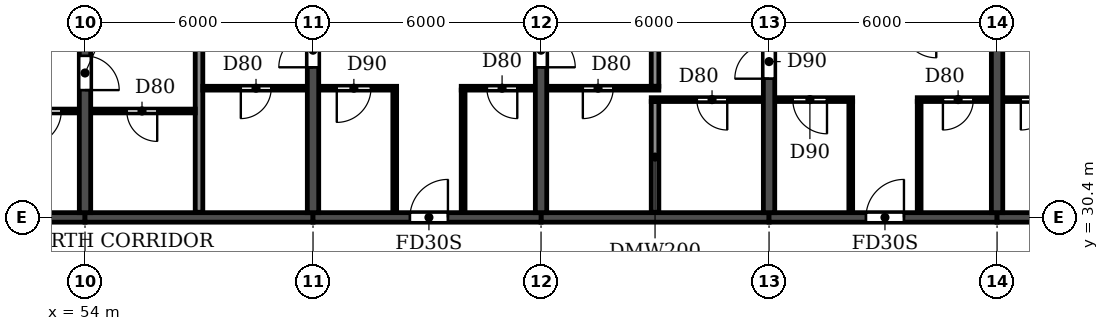
"""IFC4 building model, lengths in metres.
Left out: names, types, materials, properties, quantities, classifications, styles, units other than length and angle.
Written with IfcOpenShell. Run it as: python <this file> out.ifc"""

import sys

from ifc_helpers import new_model, si_unit, direction, frame, frame_2d, origin, place, context, subcontext, project, spatial, rectangle, extrude, element, fill, save


model = new_model("IFC4")
c1 = context("Model", 3, precision=1e-05, world=origin(), true_north=direction((0.0, 1.0)))
c2 = subcontext(c1, "Body", "Model", "MODEL_VIEW")
j1 = project(units=[si_unit("LENGTHUNIT", "METRE"), si_unit("PLANEANGLEUNIT", "RADIAN")], contexts=[c1])
p1 = place(None, origin())
s1 = spatial("IfcSite", under=j1, at=p1, CompositionType="ELEMENT")
p2 = place(p1, origin())
s2 = spatial("IfcBuilding", under=s1, at=p2, CompositionType="ELEMENT")
p3 = place(p2, frame((0.0, 0.0, 155.4)))
s3 = spatial("IfcBuildingStorey", under=s2, at=p3, CompositionType="ELEMENT", Elevation=155.4)
p4 = place(p3, frame((54.0, 30.525, 0.0), z_axis=(0.0, 0.0, 1.0), x_axis=(0.0, 1.0, 0.0)))
e1 = element("IfcWall", 1, at=p4, inside=s3, PredefinedType="SHEAR", context=c2, shape_type="SweptSolid", body=[
    extrude(rectangle(XDim=11.675, YDim=0.3, at=frame_2d((5.837, 0.0))), origin(), (0.0, 0.0, 1.0), 3.0),
])
p5 = place(p4, frame((3.225, 0.0, 0.0)))
e2 = element("IfcOpeningElement", 2, at=p5, cuts=e1, PredefinedType="OPENING", context=c2, shape_type="SweptSolid", body=[
    extrude(rectangle(XDim=0.9, YDim=2.1, at=frame_2d((0.45, 1.05))), frame((0.0, 0.16, 0.0), z_axis=(0.0, -1.0, 0.0), x_axis=(1.0, 0.0, 0.0)), (0.0, 0.0, 1.0), 0.32),
])
p6 = place(p3, frame((60.0, 30.525, 0.0), z_axis=(0.0, 0.0, 1.0), x_axis=(0.0, 1.0, 0.0)))
e3 = element("IfcWall", 3, at=p6, inside=s3, PredefinedType="SHEAR", context=c2, shape_type="SweptSolid", body=[
    extrude(rectangle(XDim=11.675, YDim=0.3, at=frame_2d((5.837, 0.0))), origin(), (0.0, 0.0, 1.0), 3.0),
])
p7 = place(p6, frame((3.825, 0.0, 0.0)))
e4 = element("IfcOpeningElement", 4, at=p7, cuts=e3, PredefinedType="OPENING", context=c2, shape_type="SweptSolid", body=[
    extrude(rectangle(XDim=0.9, YDim=2.1, at=frame_2d((0.45, 1.05))), frame((0.0, 0.16, 0.0), z_axis=(0.0, -1.0, 0.0), x_axis=(1.0, 0.0, 0.0)), (0.0, 0.0, 1.0), 0.32),
])
p8 = place(p3, frame((66.0, 30.525, 0.0), z_axis=(0.0, 0.0, 1.0), x_axis=(0.0, 1.0, 0.0)))
e5 = element("IfcWall", 5, at=p8, inside=s3, PredefinedType="SHEAR", context=c2, shape_type="SweptSolid", body=[
    extrude(rectangle(XDim=11.675, YDim=0.3, at=frame_2d((5.837, 0.0))), origin(), (0.0, 0.0, 1.0), 3.0),
])
p9 = place(p8, frame((3.825, 0.0, 0.0)))
e6 = element("IfcOpeningElement", 6, at=p9, cuts=e5, PredefinedType="OPENING", context=c2, shape_type="SweptSolid", body=[
    extrude(rectangle(XDim=0.9, YDim=2.1, at=frame_2d((0.45, 1.05))), frame((0.0, 0.16, 0.0), z_axis=(0.0, -1.0, 0.0), x_axis=(1.0, 0.0, 0.0)), (0.0, 0.0, 1.0), 0.32),
])
p10 = place(p3, frame((72.0, 30.525, 0.0), z_axis=(0.0, 0.0, 1.0), x_axis=(0.0, 1.0, 0.0)))
e7 = element("IfcWall", 7, at=p10, inside=s3, PredefinedType="SHEAR", context=c2, shape_type="SweptSolid", body=[
    extrude(rectangle(XDim=11.675, YDim=0.3, at=frame_2d((5.837, 0.0))), origin(), (0.0, 0.0, 1.0), 3.0),
])
p11 = place(p10, frame((3.525, 0.0, 0.0)))
e8 = element("IfcOpeningElement", 8, at=p11, cuts=e7, PredefinedType="OPENING", context=c2, shape_type="SweptSolid", body=[
    extrude(rectangle(XDim=0.9, YDim=2.1, at=frame_2d((0.45, 1.05))), frame((0.0, 0.16, 0.0), z_axis=(0.0, -1.0, 0.0), x_axis=(1.0, 0.0, 0.0)), (0.0, 0.0, 1.0), 0.32),
])
p12 = place(p3, frame((78.0, 30.525, 0.0), z_axis=(0.0, 0.0, 1.0), x_axis=(0.0, 1.0, 0.0)))
e9 = element("IfcWall", 9, at=p12, inside=s3, PredefinedType="SHEAR", context=c2, shape_type="SweptSolid", body=[
    extrude(rectangle(XDim=11.675, YDim=0.3, at=frame_2d((5.837, 0.0))), origin(), (0.0, 0.0, 1.0), 3.0),
])
p13 = place(p3, frame((48.0, 30.4, 0.0), z_axis=(0.0, 0.0, 1.0), x_axis=(1.0, 0.0, 0.0)))
e10 = element("IfcWall", 10, at=p13, inside=s3, PredefinedType="SHEAR", context=c2, shape_type="SweptSolid", body=[
    extrude(rectangle(XDim=6.0, YDim=0.25, at=frame_2d((3.0, 0.0))), origin(), (0.0, 0.0, 1.0), 2.4),
])
p14 = place(p13, frame((2.45, 0.0, 0.0)))
e11 = element("IfcOpeningElement", 11, at=p14, cuts=e10, PredefinedType="OPENING", context=c2, shape_type="SweptSolid", body=[
    extrude(rectangle(XDim=1.0, YDim=2.1, at=frame_2d((0.5, 1.05))), frame((0.0, 0.135, 0.0), z_axis=(0.0, -1.0, 0.0), x_axis=(1.0, 0.0, 0.0)), (0.0, 0.0, 1.0), 0.27),
])
p15 = place(p3, frame((54.0, 30.4, 0.0), z_axis=(0.0, 0.0, 1.0), x_axis=(1.0, 0.0, 0.0)))
e12 = element("IfcWall", 12, at=p15, inside=s3, PredefinedType="SHEAR", context=c2, shape_type="SweptSolid", body=[
    extrude(rectangle(XDim=6.0, YDim=0.25, at=frame_2d((3.0, 0.0))), origin(), (0.0, 0.0, 1.0), 2.4),
])
p16 = place(p3, frame((60.0, 30.4, 0.0), z_axis=(0.0, 0.0, 1.0), x_axis=(1.0, 0.0, 0.0)))
e13 = element("IfcWall", 13, at=p16, inside=s3, PredefinedType="SHEAR", context=c2, shape_type="SweptSolid", body=[
    extrude(rectangle(XDim=6.0, YDim=0.25, at=frame_2d((3.0, 0.0))), origin(), (0.0, 0.0, 1.0), 2.4),
])
p17 = place(p16, frame((2.55, 0.0, 0.0)))
e14 = element("IfcOpeningElement", 14, at=p17, cuts=e13, PredefinedType="OPENING", context=c2, shape_type="SweptSolid", body=[
    extrude(rectangle(XDim=1.0, YDim=2.1, at=frame_2d((0.5, 1.05))), frame((0.0, 0.135, 0.0), z_axis=(0.0, -1.0, 0.0), x_axis=(1.0, 0.0, 0.0)), (0.0, 0.0, 1.0), 0.27),
])
p18 = place(p3, frame((66.0, 30.4, 0.0), z_axis=(0.0, 0.0, 1.0), x_axis=(1.0, 0.0, 0.0)))
e15 = element("IfcWall", 15, at=p18, inside=s3, PredefinedType="SHEAR", context=c2, shape_type="SweptSolid", body=[
    extrude(rectangle(XDim=6.0, YDim=0.25, at=frame_2d((3.0, 0.0))), origin(), (0.0, 0.0, 1.0), 2.4),
])
p19 = place(p3, frame((72.0, 30.4, 0.0), z_axis=(0.0, 0.0, 1.0), x_axis=(1.0, 0.0, 0.0)))
e16 = element("IfcWall", 16, at=p19, inside=s3, PredefinedType="SHEAR", context=c2, shape_type="SweptSolid", body=[
    extrude(rectangle(XDim=6.0, YDim=0.25, at=frame_2d((3.0, 0.0))), origin(), (0.0, 0.0, 1.0), 2.4),
])
p20 = place(p19, frame((2.55, 0.0, 0.0)))
e17 = element("IfcOpeningElement", 17, at=p20, cuts=e16, PredefinedType="OPENING", context=c2, shape_type="SweptSolid", body=[
    extrude(rectangle(XDim=1.0, YDim=2.1, at=frame_2d((0.5, 1.05))), frame((0.0, 0.135, 0.0), z_axis=(0.0, -1.0, 0.0), x_axis=(1.0, 0.0, 0.0)), (0.0, 0.0, 1.0), 0.27),
])
p21 = place(p3, frame((78.0, 30.4, 0.0), z_axis=(0.0, 0.0, 1.0), x_axis=(1.0, 0.0, 0.0)))
e18 = element("IfcWall", 18, at=p21, inside=s3, PredefinedType="SHEAR", context=c2, shape_type="SweptSolid", body=[
    extrude(rectangle(XDim=6.0, YDim=0.25, at=frame_2d((3.0, 0.0))), origin(), (0.0, 0.0, 1.0), 2.4),
])
p22 = place(p21, frame((2.45, 0.0, 0.0)))
e19 = element("IfcOpeningElement", 19, at=p22, cuts=e18, PredefinedType="OPENING", context=c2, shape_type="SweptSolid", body=[
    extrude(rectangle(XDim=1.0, YDim=2.1, at=frame_2d((0.5, 1.05))), frame((0.0, 0.135, 0.0), z_axis=(0.0, -1.0, 0.0), x_axis=(1.0, 0.0, 0.0)), (0.0, 0.0, 1.0), 0.27),
])
p23 = place(p3, frame((57.0, 30.535, 0.0), z_axis=(0.0, 0.0, 1.0), x_axis=(0.0, 1.0, 0.0)))
e20 = element("IfcWall", 20, at=p23, inside=s3, PredefinedType="PARTITIONING", context=c2, shape_type="SweptSolid", body=[
    extrude(rectangle(XDim=11.805, YDim=0.2, at=frame_2d((5.903, 0.0))), origin(), (0.0, 0.0, 1.0), 3.0),
])
p24 = place(p3, frame((69.0, 30.535, 0.0), z_axis=(0.0, 0.0, 1.0), x_axis=(0.0, 1.0, 0.0)))
e21 = element("IfcWall", 21, at=p24, inside=s3, PredefinedType="PARTITIONING", context=c2, shape_type="SweptSolid", body=[
    extrude(rectangle(XDim=2.915, YDim=0.2, at=frame_2d((1.458, 0.0))), origin(), (0.0, 0.0, 1.0), 3.0),
])
p25 = place(p3, frame((69.0, 33.85, 0.0), z_axis=(0.0, 0.0, 1.0), x_axis=(0.0, 1.0, 0.0)))
e22 = element("IfcWall", 22, at=p25, inside=s3, PredefinedType="PARTITIONING", context=c2, shape_type="SweptSolid", body=[
    extrude(rectangle(XDim=8.49, YDim=0.2, at=frame_2d((4.245, 0.0))), origin(), (0.0, 0.0, 1.0), 3.0),
])
p26 = place(p3, frame((51.8, 33.2, 0.0), z_axis=(0.0, 0.0, 1.0), x_axis=(1.0, 0.0, 0.0)))
e23 = element("IfcWall", 23, at=p26, inside=s3, PredefinedType="PARTITIONING", context=c2, shape_type="SweptSolid", body=[
    extrude(rectangle(XDim=2.04, YDim=0.1, at=frame_2d((1.02, 0.0))), origin(), (0.0, 0.0, 1.0), 3.0),
])
p27 = place(p26, frame((0.675, 0.0, 0.0)))
e24 = element("IfcOpeningElement", 24, at=p27, cuts=e23, PredefinedType="OPENING", context=c2, shape_type="SweptSolid", body=[
    extrude(rectangle(XDim=0.9, YDim=2.1, at=frame_2d((0.45, 1.05))), frame((0.0, 0.06, 0.0), z_axis=(0.0, -1.0, 0.0), x_axis=(1.0, 0.0, 0.0)), (0.0, 0.0, 1.0), 0.12),
])
p28 = place(p3, frame((54.16, 33.2, 0.0), z_axis=(0.0, 0.0, 1.0), x_axis=(1.0, 0.0, 0.0)))
e25 = element("IfcWall", 25, at=p28, inside=s3, PredefinedType="PARTITIONING", context=c2, shape_type="SweptSolid", body=[
    extrude(rectangle(XDim=2.74, YDim=0.1, at=frame_2d((1.37, 0.0))), origin(), (0.0, 0.0, 1.0), 3.0),
])
p29 = place(p28, frame((0.94, 0.0, 0.0)))
e26 = element("IfcOpeningElement", 26, at=p29, cuts=e25, PredefinedType="OPENING", context=c2, shape_type="SweptSolid", body=[
    extrude(rectangle(XDim=0.8, YDim=2.1, at=frame_2d((0.4, 1.05))), frame((0.0, 0.06, 0.0), z_axis=(0.0, -1.0, 0.0), x_axis=(1.0, 0.0, 0.0)), (0.0, 0.0, 1.0), 0.12),
])
p30 = place(p3, frame((68.9, 33.5, 0.0), z_axis=(0.0, 0.0, 1.0), x_axis=(1.0, 0.0, 0.0)))
e27 = element("IfcWall", 27, at=p30, inside=s3, PredefinedType="PARTITIONING", context=c2, shape_type="SweptSolid", body=[
    extrude(rectangle(XDim=2.94, YDim=0.1, at=frame_2d((1.47, 0.0))), origin(), (0.0, 0.0, 1.0), 3.0),
])
p31 = place(p30, frame((1.2, 0.0, 0.0)))
e28 = element("IfcOpeningElement", 28, at=p31, cuts=e27, PredefinedType="OPENING", context=c2, shape_type="SweptSolid", body=[
    extrude(rectangle(XDim=0.8, YDim=2.1, at=frame_2d((0.4, 1.05))), frame((0.0, 0.06, 0.0), z_axis=(0.0, -1.0, 0.0), x_axis=(1.0, 0.0, 0.0)), (0.0, 0.0, 1.0), 0.12),
])
p32 = place(p3, frame((72.16, 33.5, 0.0), z_axis=(0.0, 0.0, 1.0), x_axis=(1.0, 0.0, 0.0)))
e29 = element("IfcWall", 29, at=p32, inside=s3, PredefinedType="PARTITIONING", context=c2, shape_type="SweptSolid", body=[
    extrude(rectangle(XDim=2.04, YDim=0.1, at=frame_2d((1.02, 0.0))), origin(), (0.0, 0.0, 1.0), 3.0),
])
p33 = place(p32, frame((0.465, 0.0, 0.0)))
e30 = element("IfcOpeningElement", 30, at=p33, cuts=e29, PredefinedType="OPENING", context=c2, shape_type="SweptSolid", body=[
    extrude(rectangle(XDim=0.9, YDim=2.1, at=frame_2d((0.45, 1.05))), frame((0.0, 0.06, 0.0), z_axis=(0.0, -1.0, 0.0), x_axis=(1.0, 0.0, 0.0)), (0.0, 0.0, 1.0), 0.12),
])
p34 = place(p3, frame((75.9, 33.5, 0.0), z_axis=(0.0, 0.0, 1.0), x_axis=(1.0, 0.0, 0.0)))
e31 = element("IfcWall", 31, at=p34, inside=s3, PredefinedType="PARTITIONING", context=c2, shape_type="SweptSolid", body=[
    extrude(rectangle(XDim=1.94, YDim=0.1, at=frame_2d((0.97, 0.0))), origin(), (0.0, 0.0, 1.0), 3.0),
])
p35 = place(p34, frame((0.675, 0.0, 0.0)))
e32 = element("IfcOpeningElement", 32, at=p35, cuts=e31, PredefinedType="OPENING", context=c2, shape_type="SweptSolid", body=[
    extrude(rectangle(XDim=0.8, YDim=2.1, at=frame_2d((0.4, 1.05))), frame((0.0, 0.06, 0.0), z_axis=(0.0, -1.0, 0.0), x_axis=(1.0, 0.0, 0.0)), (0.0, 0.0, 1.0), 0.12),
])
p36 = place(p3, frame((78.16, 33.5, 0.0), z_axis=(0.0, 0.0, 1.0), x_axis=(1.0, 0.0, 0.0)))
e33 = element("IfcWall", 33, at=p36, inside=s3, PredefinedType="PARTITIONING", context=c2, shape_type="SweptSolid", body=[
    extrude(rectangle(XDim=1.94, YDim=0.1, at=frame_2d((0.97, 0.0))), origin(), (0.0, 0.0, 1.0), 3.0),
])
p37 = place(p36, frame((0.465, 0.0, 0.0)))
e34 = element("IfcOpeningElement", 34, at=p37, cuts=e33, PredefinedType="OPENING", context=c2, shape_type="SweptSolid", body=[
    extrude(rectangle(XDim=0.8, YDim=2.1, at=frame_2d((0.4, 1.05))), frame((0.0, 0.06, 0.0), z_axis=(0.0, -1.0, 0.0), x_axis=(1.0, 0.0, 0.0)), (0.0, 0.0, 1.0), 0.12),
])
p38 = place(p3, frame((57.1, 33.8, 0.0), z_axis=(0.0, 0.0, 1.0), x_axis=(1.0, 0.0, 0.0)))
e35 = element("IfcWall", 35, at=p38, inside=s3, PredefinedType="PARTITIONING", context=c2, shape_type="SweptSolid", body=[
    extrude(rectangle(XDim=2.74, YDim=0.1, at=frame_2d((1.37, 0.0))), origin(), (0.0, 0.0, 1.0), 3.0),
])
p39 = place(p38, frame((1.0, 0.0, 0.0)))
e36 = element("IfcOpeningElement", 36, at=p39, cuts=e35, PredefinedType="OPENING", context=c2, shape_type="SweptSolid", body=[
    extrude(rectangle(XDim=0.8, YDim=2.1, at=frame_2d((0.4, 1.05))), frame((0.0, 0.06, 0.0), z_axis=(0.0, -1.0, 0.0), x_axis=(1.0, 0.0, 0.0)), (0.0, 0.0, 1.0), 0.12),
])
p40 = place(p3, frame((60.16, 33.8, 0.0), z_axis=(0.0, 0.0, 1.0), x_axis=(1.0, 0.0, 0.0)))
e37 = element("IfcWall", 37, at=p40, inside=s3, PredefinedType="PARTITIONING", context=c2, shape_type="SweptSolid", body=[
    extrude(rectangle(XDim=2.04, YDim=0.1, at=frame_2d((1.02, 0.0))), origin(), (0.0, 0.0, 1.0), 3.0),
])
p41 = place(p40, frame((0.465, 0.0, 0.0)))
e38 = element("IfcOpeningElement", 38, at=p41, cuts=e37, PredefinedType="OPENING", context=c2, shape_type="SweptSolid", body=[
    extrude(rectangle(XDim=0.9, YDim=2.1, at=frame_2d((0.45, 1.05))), frame((0.0, 0.06, 0.0), z_axis=(0.0, -1.0, 0.0), x_axis=(1.0, 0.0, 0.0)), (0.0, 0.0, 1.0), 0.12),
])
p42 = place(p3, frame((63.9, 33.8, 0.0), z_axis=(0.0, 0.0, 1.0), x_axis=(1.0, 0.0, 0.0)))
e39 = element("IfcWall", 39, at=p42, inside=s3, PredefinedType="PARTITIONING", context=c2, shape_type="SweptSolid", body=[
    extrude(rectangle(XDim=1.94, YDim=0.1, at=frame_2d((0.97, 0.0))), origin(), (0.0, 0.0, 1.0), 3.0),
])
p43 = place(p42, frame((0.675, 0.0, 0.0)))
e40 = element("IfcOpeningElement", 40, at=p43, cuts=e39, PredefinedType="OPENING", context=c2, shape_type="SweptSolid", body=[
    extrude(rectangle(XDim=0.8, YDim=2.1, at=frame_2d((0.4, 1.05))), frame((0.0, 0.06, 0.0), z_axis=(0.0, -1.0, 0.0), x_axis=(1.0, 0.0, 0.0)), (0.0, 0.0, 1.0), 0.12),
])
p44 = place(p3, frame((66.16, 33.8, 0.0), z_axis=(0.0, 0.0, 1.0), x_axis=(1.0, 0.0, 0.0)))
e41 = element("IfcWall", 41, at=p44, inside=s3, PredefinedType="PARTITIONING", context=c2, shape_type="SweptSolid", body=[
    extrude(rectangle(XDim=2.94, YDim=0.1, at=frame_2d((1.47, 0.0))), origin(), (0.0, 0.0, 1.0), 3.0),
])
p45 = place(p44, frame((0.94, 0.0, 0.0)))
e42 = element("IfcOpeningElement", 42, at=p45, cuts=e41, PredefinedType="OPENING", context=c2, shape_type="SweptSolid", body=[
    extrude(rectangle(XDim=0.8, YDim=2.1, at=frame_2d((0.4, 1.05))), frame((0.0, 0.06, 0.0), z_axis=(0.0, -1.0, 0.0), x_axis=(1.0, 0.0, 0.0)), (0.0, 0.0, 1.0), 0.12),
])
for number, where, z_axis, x_axis in (
    (43, (62.15, 30.535, 0.0), (0.0, 0.0, 1.0), (0.0, 1.0, 0.0)),
    (44, (63.95, 30.535, 0.0), (0.0, 0.0, 1.0), (0.0, 1.0, 0.0)),
):
    element("IfcWall", number, at=place(p3, frame(where, z_axis=z_axis, x_axis=x_axis)), inside=s3, PredefinedType="PARTITIONING", context=c2, shape_type="SweptSolid", body=[
        extrude(rectangle(XDim=3.215, YDim=0.1, at=frame_2d((1.607, 0.0))), origin(), (0.0, 0.0, 1.0), 3.0),
    ])
for number, where, z_axis, x_axis in (
    (45, (74.15, 30.535, 0.0), (0.0, 0.0, 1.0), (0.0, 1.0, 0.0)),
    (46, (75.95, 30.535, 0.0), (0.0, 0.0, 1.0), (0.0, 1.0, 0.0)),
):
    element("IfcWall", number, at=place(p3, frame(where, z_axis=z_axis, x_axis=x_axis)), inside=s3, PredefinedType="PARTITIONING", context=c2, shape_type="SweptSolid", body=[
        extrude(rectangle(XDim=2.915, YDim=0.1, at=frame_2d((1.458, 0.0))), origin(), (0.0, 0.0, 1.0), 3.0),
    ])
p46 = place(p29, frame((0.8, 0.0, 0.0), z_axis=(0.0, 0.0, 1.0), x_axis=(-1.0, 0.0, 0.0)))
e47 = element("IfcDoor", 47, at=p46, inside=s3, OperationType="SINGLE_SWING_LEFT", PredefinedType="DOOR", context=c2, shape_type="SweptSolid", body=[
    extrude(rectangle(XDim=0.8, YDim=2.1, at=frame_2d((0.4, 1.05))), frame((0.0, 0.025, 0.0), z_axis=(0.0, -1.0, 0.0), x_axis=(1.0, 0.0, 0.0)), (0.0, 0.0, 1.0), 0.05),
])
fill(e26, e47)
p47 = place(p27, frame((0.9, 0.0, 0.0), z_axis=(0.0, 0.0, 1.0), x_axis=(-1.0, 0.0, 0.0)))
e48 = element("IfcDoor", 48, at=p47, inside=s3, OperationType="SINGLE_SWING_RIGHT", PredefinedType="DOOR", context=c2, shape_type="SweptSolid", body=[
    extrude(rectangle(XDim=0.9, YDim=2.1, at=frame_2d((0.45, 1.05))), frame((0.0, 0.025, 0.0), z_axis=(0.0, -1.0, 0.0), x_axis=(1.0, 0.0, 0.0)), (0.0, 0.0, 1.0), 0.05),
])
fill(e24, e48)
p48 = place(p5, frame((0.9, 0.0, 0.0), z_axis=(0.0, 0.0, 1.0), x_axis=(-1.0, 0.0, 0.0)))
e49 = element("IfcDoor", 49, at=p48, inside=s3, OperationType="SINGLE_SWING_RIGHT", PredefinedType="DOOR", context=c2, shape_type="SweptSolid", body=[
    extrude(rectangle(XDim=0.9, YDim=2.1, at=frame_2d((0.45, 1.05))), frame((0.0, 0.025, 0.0), z_axis=(0.0, -1.0, 0.0), x_axis=(1.0, 0.0, 0.0)), (0.0, 0.0, 1.0), 0.05),
])
fill(e2, e49)
p49 = place(p39, frame((0.8, 0.0, 0.0), z_axis=(0.0, 0.0, 1.0), x_axis=(-1.0, 0.0, 0.0)))
e50 = element("IfcDoor", 50, at=p49, inside=s3, OperationType="SINGLE_SWING_RIGHT", PredefinedType="DOOR", context=c2, shape_type="SweptSolid", body=[
    extrude(rectangle(XDim=0.8, YDim=2.1, at=frame_2d((0.4, 1.05))), frame((0.0, 0.025, 0.0), z_axis=(0.0, -1.0, 0.0), x_axis=(1.0, 0.0, 0.0)), (0.0, 0.0, 1.0), 0.05),
])
fill(e36, e50)
p50 = place(p45, frame((0.8, 0.0, 0.0), z_axis=(0.0, 0.0, 1.0), x_axis=(-1.0, 0.0, 0.0)))
e51 = element("IfcDoor", 51, at=p50, inside=s3, OperationType="SINGLE_SWING_RIGHT", PredefinedType="DOOR", context=c2, shape_type="SweptSolid", body=[
    extrude(rectangle(XDim=0.8, YDim=2.1, at=frame_2d((0.4, 1.05))), frame((0.0, 0.025, 0.0), z_axis=(0.0, -1.0, 0.0), x_axis=(1.0, 0.0, 0.0)), (0.0, 0.0, 1.0), 0.05),
])
fill(e42, e51)
p51 = place(p7, origin())
e52 = element("IfcDoor", 52, at=p51, inside=s3, OperationType="SINGLE_SWING_LEFT", PredefinedType="DOOR", context=c2, shape_type="SweptSolid", body=[
    extrude(rectangle(XDim=0.9, YDim=2.1, at=frame_2d((0.45, 1.05))), frame((0.0, 0.025, 0.0), z_axis=(0.0, -1.0, 0.0), x_axis=(1.0, 0.0, 0.0)), (0.0, 0.0, 1.0), 0.05),
])
fill(e4, e52)
p52 = place(p41, frame((0.9, 0.0, 0.0), z_axis=(0.0, 0.0, 1.0), x_axis=(-1.0, 0.0, 0.0)))
e53 = element("IfcDoor", 53, at=p52, inside=s3, OperationType="SINGLE_SWING_RIGHT", PredefinedType="DOOR", context=c2, shape_type="SweptSolid", body=[
    extrude(rectangle(XDim=0.9, YDim=2.1, at=frame_2d((0.45, 1.05))), frame((0.0, 0.025, 0.0), z_axis=(0.0, -1.0, 0.0), x_axis=(1.0, 0.0, 0.0)), (0.0, 0.0, 1.0), 0.05),
])
fill(e38, e53)
p53 = place(p17, origin())
e54 = element("IfcDoor", 54, at=p53, inside=s3, OperationType="SINGLE_SWING_RIGHT", PredefinedType="DOOR", context=c2, shape_type="SweptSolid", body=[
    extrude(rectangle(XDim=1.0, YDim=2.1, at=frame_2d((0.5, 1.05))), frame((0.0, 0.025, 0.0), z_axis=(0.0, -1.0, 0.0), x_axis=(1.0, 0.0, 0.0)), (0.0, 0.0, 1.0), 0.05),
])
fill(e14, e54)
p54 = place(p43, frame((0.8, 0.0, 0.0), z_axis=(0.0, 0.0, 1.0), x_axis=(-1.0, 0.0, 0.0)))
e55 = element("IfcDoor", 55, at=p54, inside=s3, OperationType="SINGLE_SWING_LEFT", PredefinedType="DOOR", context=c2, shape_type="SweptSolid", body=[
    extrude(rectangle(XDim=0.8, YDim=2.1, at=frame_2d((0.4, 1.05))), frame((0.0, 0.025, 0.0), z_axis=(0.0, -1.0, 0.0), x_axis=(1.0, 0.0, 0.0)), (0.0, 0.0, 1.0), 0.05),
])
fill(e40, e55)
p55 = place(p9, frame((0.9, 0.0, 0.0), z_axis=(0.0, 0.0, 1.0), x_axis=(-1.0, 0.0, 0.0)))
e56 = element("IfcDoor", 56, at=p55, inside=s3, OperationType="SINGLE_SWING_RIGHT", PredefinedType="DOOR", context=c2, shape_type="SweptSolid", body=[
    extrude(rectangle(XDim=0.9, YDim=2.1, at=frame_2d((0.45, 1.05))), frame((0.0, 0.025, 0.0), z_axis=(0.0, -1.0, 0.0), x_axis=(1.0, 0.0, 0.0)), (0.0, 0.0, 1.0), 0.05),
])
fill(e6, e56)
p56 = place(p31, frame((0.8, 0.0, 0.0), z_axis=(0.0, 0.0, 1.0), x_axis=(-1.0, 0.0, 0.0)))
e57 = element("IfcDoor", 57, at=p56, inside=s3, OperationType="SINGLE_SWING_LEFT", PredefinedType="DOOR", context=c2, shape_type="SweptSolid", body=[
    extrude(rectangle(XDim=0.8, YDim=2.1, at=frame_2d((0.4, 1.05))), frame((0.0, 0.025, 0.0), z_axis=(0.0, -1.0, 0.0), x_axis=(1.0, 0.0, 0.0)), (0.0, 0.0, 1.0), 0.05),
])
fill(e28, e57)
p57 = place(p11, origin())
e58 = element("IfcDoor", 58, at=p57, inside=s3, OperationType="SINGLE_SWING_LEFT", PredefinedType="DOOR", context=c2, shape_type="SweptSolid", body=[
    extrude(rectangle(XDim=0.9, YDim=2.1, at=frame_2d((0.45, 1.05))), frame((0.0, 0.025, 0.0), z_axis=(0.0, -1.0, 0.0), x_axis=(1.0, 0.0, 0.0)), (0.0, 0.0, 1.0), 0.05),
])
fill(e8, e58)
p58 = place(p33, frame((0.9, 0.0, 0.0), z_axis=(0.0, 0.0, 1.0), x_axis=(-1.0, 0.0, 0.0)))
e59 = element("IfcDoor", 59, at=p58, inside=s3, OperationType="SINGLE_SWING_LEFT", PredefinedType="DOOR", context=c2, shape_type="SweptSolid", body=[
    extrude(rectangle(XDim=0.9, YDim=2.1, at=frame_2d((0.45, 1.05))), frame((0.0, 0.025, 0.0), z_axis=(0.0, -1.0, 0.0), x_axis=(1.0, 0.0, 0.0)), (0.0, 0.0, 1.0), 0.05),
])
fill(e30, e59)
p59 = place(p20, origin())
e60 = element("IfcDoor", 60, at=p59, inside=s3, OperationType="SINGLE_SWING_RIGHT", PredefinedType="DOOR", context=c2, shape_type="SweptSolid", body=[
    extrude(rectangle(XDim=1.0, YDim=2.1, at=frame_2d((0.5, 1.05))), frame((0.0, 0.025, 0.0), z_axis=(0.0, -1.0, 0.0), x_axis=(1.0, 0.0, 0.0)), (0.0, 0.0, 1.0), 0.05),
])
fill(e17, e60)
p60 = place(p35, frame((0.8, 0.0, 0.0), z_axis=(0.0, 0.0, 1.0), x_axis=(-1.0, 0.0, 0.0)))
e61 = element("IfcDoor", 61, at=p60, inside=s3, OperationType="SINGLE_SWING_RIGHT", PredefinedType="DOOR", context=c2, shape_type="SweptSolid", body=[
    extrude(rectangle(XDim=0.8, YDim=2.1, at=frame_2d((0.4, 1.05))), frame((0.0, 0.025, 0.0), z_axis=(0.0, -1.0, 0.0), x_axis=(1.0, 0.0, 0.0)), (0.0, 0.0, 1.0), 0.05),
])
fill(e32, e61)
p61 = place(p37, frame((0.8, 0.0, 0.0), z_axis=(0.0, 0.0, 1.0), x_axis=(-1.0, 0.0, 0.0)))
e62 = element("IfcDoor", 62, at=p61, inside=s3, OperationType="SINGLE_SWING_RIGHT", PredefinedType="DOOR", context=c2, shape_type="SweptSolid", body=[
    extrude(rectangle(XDim=0.8, YDim=2.1, at=frame_2d((0.4, 1.05))), frame((0.0, 0.025, 0.0), z_axis=(0.0, -1.0, 0.0), x_axis=(1.0, 0.0, 0.0)), (0.0, 0.0, 1.0), 0.05),
])
fill(e34, e62)
save(model, sys.argv[1])
